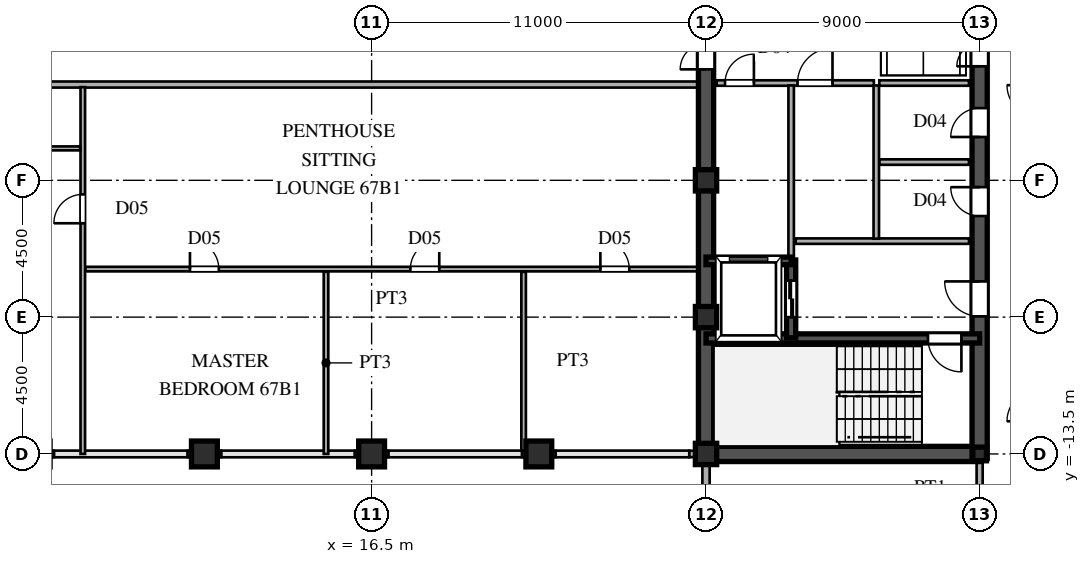
"""IFC4 building model, lengths in metres.
Left out: names, types, materials, properties, quantities, classifications, styles, units other than length and angle.
Written with IfcOpenShell. Run it as: python <this file> out.ifc"""

import sys

from ifc_helpers import new_model, si_unit, direction, frame, frame_2d, origin, origin_2d, place, context, subcontext, project, spatial, rectangle, hollow_rectangle, i_section, extrude, source, transform, mapped, element, fill, save


model = new_model("IFC4")
c1 = context("Model", 3, precision=1e-05, world=origin(), true_north=direction((0.0, 1.0)))
c2 = subcontext(c1, "Body", "Model", "MODEL_VIEW")
j1 = project(units=[si_unit("LENGTHUNIT", "METRE"), si_unit("PLANEANGLEUNIT", "RADIAN")], contexts=[c1])
p1 = place(None, origin())
s1 = spatial("IfcSite", under=j1, at=p1, CompositionType="ELEMENT")
p2 = place(p1, origin())
s2 = spatial("IfcBuilding", under=s1, at=p2, CompositionType="ELEMENT")
p3 = place(p2, frame((0.0, 0.0, 254.4)))
s3 = spatial("IfcBuildingStorey", under=s2, at=p3, CompositionType="ELEMENT", Elevation=254.4)
m1 = source(origin(), c2, "Body", "SweptSolid", [
    extrude(hollow_rectangle(XDim=0.7, YDim=0.7, WallThickness=0.03, at=origin_2d()), origin(), (0.0, 0.0, 1.0), 3.75),
])
for number, where, z_axis, x_axis in (
    (1, (27.5, -13.5, 0.0), (0.0, 0.0, 1.0), (1.0, 0.0, 0.0)),
    (2, (27.5, -9.0, 0.0), (0.0, 0.0, 1.0), (1.0, 0.0, 0.0)),
    (3, (27.5, -4.5, 0.0), (0.0, 0.0, 1.0), (1.0, 0.0, 0.0)),
):
    element("IfcColumn", number, at=place(p3, frame(where, z_axis=z_axis, x_axis=x_axis)), inside=s3, PredefinedType="COLUMN", context=c2, shape_type="MappedRepresentation", body=[
        mapped(m1, transform((0.0, 0.0, 0.0), scale=1.0)),
    ])
m2 = source(origin(), c2, "Body", "SweptSolid", [
    extrude(i_section(OverallWidth=0.45, OverallDepth=0.45, WebThickness=0.016, FlangeThickness=0.025, at=origin_2d()), origin(), (0.0, 0.0, 1.0), 3.75),
])
p4 = place(p3, frame((36.5, -13.5, 0.0), z_axis=(0.0, 0.0, 1.0), x_axis=(1.0, 0.0, 0.0)))
e4 = element("IfcColumn", 4, at=p4, inside=s3, PredefinedType="COLUMN", context=c2, shape_type="MappedRepresentation", body=[
    mapped(m2, transform((0.0, 0.0, 0.0), scale=1.0)),
])
m3 = source(origin(), c2, "Body", "SweptSolid", [
    extrude(hollow_rectangle(XDim=0.85, YDim=0.85, WallThickness=0.036, at=origin_2d()), origin(), (0.0, 0.0, 1.0), 3.75),
])
for number, where, z_axis, x_axis in (
    (5, (11.0, -13.5, 0.0), (0.0, 0.0, 1.0), (1.0, 0.0, 0.0)),
    (6, (16.5, -13.5, 0.0), (0.0, 0.0, 1.0), (1.0, 0.0, 0.0)),
    (7, (22.0, -13.5, 0.0), (0.0, 0.0, 1.0), (1.0, 0.0, 0.0)),
):
    element("IfcColumn", number, at=place(p3, frame(where, z_axis=z_axis, x_axis=x_axis)), inside=s3, PredefinedType="COLUMN", context=c2, shape_type="MappedRepresentation", body=[
        mapped(m3, transform((0.0, 0.0, 0.0), scale=1.0)),
    ])
p5 = place(p3, frame((27.5, -15.98, 0.0), z_axis=(0.0, 0.0, 1.0), x_axis=(0.0, 1.0, 0.0)))
e8 = element("IfcWall", 8, at=p5, inside=s3, PredefinedType="SOLIDWALL", context=c2, shape_type="SweptSolid", body=[
    extrude(rectangle(XDim=1.605, YDim=0.24, at=frame_2d((0.803, 0.0))), origin(), (0.0, 0.0, 1.0), 3.53),
])
p6 = place(p3, frame((27.5, -14.375, 0.0), z_axis=(0.0, 0.0, 1.0), x_axis=(0.0, 1.0, 0.0)))
e9 = element("IfcWall", 9, at=p6, inside=s3, PredefinedType="SOLIDWALL", context=c2, shape_type="SweptSolid", body=[
    extrude(rectangle(XDim=0.62, YDim=0.24, at=frame_2d((0.31, 0.0))), origin(), (0.0, 0.0, 1.0), 3.03),
])
for number, where, z_axis, x_axis in (
    (10, (4.95, -13.5, 0.0), (0.0, 0.0, 1.0), (1.0, 0.0, 0.0)),
    (11, (10.45, -13.5, 0.0), (0.0, 0.0, 1.0), (1.0, 0.0, 0.0)),
    (12, (15.95, -13.5, 0.0), (0.0, 0.0, 1.0), (1.0, 0.0, 0.0)),
    (13, (21.45, -13.5, 0.0), (0.0, 0.0, 1.0), (1.0, 0.0, 0.0)),
):
    element("IfcWall", number, at=place(p3, frame(where, z_axis=z_axis, x_axis=x_axis)), inside=s3, PredefinedType="SOLIDWALL", context=c2, shape_type="SweptSolid", body=[
        extrude(rectangle(XDim=1.1, YDim=0.21, at=frame_2d((0.55, 0.0))), origin(), (0.0, 0.0, 1.0), 3.03),
    ])
p7 = place(p3, frame((26.95, -13.5, 0.0), z_axis=(0.0, 0.0, 1.0), x_axis=(1.0, 0.0, 0.0)))
e14 = element("IfcWall", 14, at=p7, inside=s3, PredefinedType="SOLIDWALL", context=c2, shape_type="SweptSolid", body=[
    extrude(rectangle(XDim=0.54, YDim=0.21, at=frame_2d((0.27, 0.0))), origin(), (0.0, 0.0, 1.0), 3.03),
])
p8 = place(p3, frame((27.5, -13.5, 0.0), z_axis=(0.0, 0.0, 1.0), x_axis=(0.0, 1.0, 0.0)))
e15 = element("IfcWall", 15, at=p8, inside=s3, PredefinedType="SHEAR", context=c2, shape_type="SweptSolid", body=[
    extrude(rectangle(XDim=12.2, YDim=0.5, at=frame_2d((6.1, 0.0))), origin(), (0.0, 0.0, 1.0), 3.53),
])
p9 = place(p3, frame((27.5, -1.3, 0.0), z_axis=(0.0, 0.0, 1.0), x_axis=(0.0, 1.0, 0.0)))
e16 = element("IfcWall", 16, at=p9, inside=s3, PredefinedType="SHEAR", context=c2, shape_type="SweptSolid", body=[
    extrude(rectangle(XDim=2.6, YDim=0.5, at=frame_2d((1.3, 0.0))), origin(), (0.0, 0.0, 1.0), 3.53),
])
p10 = place(p9, frame((0.45, 0.0, 0.0)))
e17 = element("IfcOpeningElement", 17, at=p10, cuts=e16, PredefinedType="OPENING", context=c2, shape_type="SweptSolid", body=[
    extrude(rectangle(XDim=1.7, YDim=2.35, at=frame_2d((0.85, 1.175))), frame((0.0, 0.26, 0.0), z_axis=(0.0, -1.0, 0.0), x_axis=(1.0, 0.0, 0.0)), (0.0, 0.0, 1.0), 0.52),
])
p11 = place(p3, frame((27.5, -13.5, 0.0), z_axis=(0.0, 0.0, 1.0), x_axis=(1.0, 0.0, 0.0)))
e18 = element("IfcWall", 18, at=p11, inside=s3, PredefinedType="SHEAR", context=c2, shape_type="SweptSolid", body=[
    extrude(rectangle(XDim=9.0, YDim=0.5, at=frame_2d((4.5, 0.0))), origin(), (0.0, 0.0, 1.0), 3.53),
])
p12 = place(p3, frame((36.5, -13.65, 0.0), z_axis=(0.0, 0.0, 1.0), x_axis=(0.0, 1.0, 0.0)))
e19 = element("IfcWall", 19, at=p12, inside=s3, PredefinedType="SHEAR", context=c2, shape_type="SweptSolid", body=[
    extrude(rectangle(XDim=7.15, YDim=0.5, at=frame_2d((3.575, 0.0))), origin(), (0.0, 0.0, 1.0), 3.53),
])
p13 = place(p12, frame((4.675, 0.0, 0.0)))
e20 = element("IfcOpeningElement", 20, at=p13, cuts=e19, PredefinedType="OPENING", context=c2, shape_type="SweptSolid", body=[
    extrude(rectangle(XDim=1.15, YDim=2.2, at=frame_2d((0.575, 1.1))), frame((0.0, 0.26, 0.0), z_axis=(0.0, -1.0, 0.0), x_axis=(1.0, 0.0, 0.0)), (0.0, 0.0, 1.0), 0.52),
])
p14 = place(p3, frame((36.5, -1.3, 0.0), z_axis=(0.0, 0.0, 1.0), x_axis=(0.0, 1.0, 0.0)))
e21 = element("IfcWall", 21, at=p14, inside=s3, PredefinedType="SHEAR", context=c2, shape_type="SweptSolid", body=[
    extrude(rectangle(XDim=2.6, YDim=0.5, at=frame_2d((1.3, 0.0))), origin(), (0.0, 0.0, 1.0), 3.53),
])
p15 = place(p14, frame((0.55, 0.0, 0.0)))
e22 = element("IfcOpeningElement", 22, at=p15, cuts=e21, PredefinedType="OPENING", context=c2, shape_type="SweptSolid", body=[
    extrude(rectangle(XDim=1.5, YDim=2.3, at=frame_2d((0.75, 1.15))), frame((0.0, 0.26, 0.0), z_axis=(0.0, -1.0, 0.0), x_axis=(1.0, 0.0, 0.0)), (0.0, 0.0, 1.0), 0.52),
])
p16 = place(p3, frame((36.5, -6.5, 0.0), z_axis=(0.0, 0.0, 1.0), x_axis=(0.0, 1.0, 0.0)))
e23 = element("IfcWall", 23, at=p16, inside=s3, PredefinedType="SHEAR", context=c2, shape_type="SweptSolid", body=[
    extrude(rectangle(XDim=2.6, YDim=0.5, at=frame_2d((1.3, 0.0))), origin(), (0.0, 0.0, 1.0), 3.53),
])
p17 = place(p16, frame((0.825, 0.0, 0.0)))
e24 = element("IfcOpeningElement", 24, at=p17, cuts=e23, PredefinedType="OPENING", context=c2, shape_type="SweptSolid", body=[
    extrude(rectangle(XDim=0.95, YDim=2.15, at=frame_2d((0.475, 1.075))), frame((0.0, 0.26, 0.0), z_axis=(0.0, -1.0, 0.0), x_axis=(1.0, 0.0, 0.0)), (0.0, 0.0, 1.0), 0.52),
])
p18 = place(p3, frame((36.5, -3.9, 0.0), z_axis=(0.0, 0.0, 1.0), x_axis=(0.0, 1.0, 0.0)))
e25 = element("IfcWall", 25, at=p18, inside=s3, PredefinedType="SHEAR", context=c2, shape_type="SweptSolid", body=[
    extrude(rectangle(XDim=2.6, YDim=0.5, at=frame_2d((1.3, 0.0))), origin(), (0.0, 0.0, 1.0), 3.53),
])
p19 = place(p18, frame((0.825, 0.0, 0.0)))
e26 = element("IfcOpeningElement", 26, at=p19, cuts=e25, PredefinedType="OPENING", context=c2, shape_type="SweptSolid", body=[
    extrude(rectangle(XDim=0.95, YDim=2.15, at=frame_2d((0.475, 1.075))), frame((0.0, 0.26, 0.0), z_axis=(0.0, -1.0, 0.0), x_axis=(1.0, 0.0, 0.0)), (0.0, 0.0, 1.0), 0.52),
])
p20 = place(p3, frame((27.5, -9.7, 0.0), z_axis=(0.0, 0.0, 1.0), x_axis=(1.0, 0.0, 0.0)))
e27 = element("IfcWall", 27, at=p20, inside=s3, PredefinedType="SHEAR", context=c2, shape_type="SweptSolid", body=[
    extrude(rectangle(XDim=9.0, YDim=0.3, at=frame_2d((4.5, 0.0))), origin(), (0.0, 0.0, 1.0), 3.53),
])
p21 = place(p20, frame((7.3, 0.0, 0.0)))
e28 = element("IfcOpeningElement", 28, at=p21, cuts=e27, PredefinedType="OPENING", context=c2, shape_type="SweptSolid", body=[
    extrude(rectangle(XDim=1.1, YDim=2.2, at=frame_2d((0.55, 1.1))), frame((0.0, 0.16, 0.0), z_axis=(0.0, -1.0, 0.0), x_axis=(1.0, 0.0, 0.0)), (0.0, 0.0, 1.0), 0.32),
])
p22 = place(p3, frame((27.5, -7.15, 0.0), z_axis=(0.0, 0.0, 1.0), x_axis=(1.0, 0.0, 0.0)))
e29 = element("IfcWall", 29, at=p22, inside=s3, PredefinedType="SHEAR", context=c2, shape_type="SweptSolid", body=[
    extrude(rectangle(XDim=2.8, YDim=0.25, at=frame_2d((1.4, 0.0))), origin(), (0.0, 0.0, 1.0), 3.53),
])
p23 = place(p3, frame((30.3, -9.68, 0.0), z_axis=(0.0, 0.0, 1.0), x_axis=(0.0, 1.0, 0.0)))
e30 = element("IfcWall", 30, at=p23, inside=s3, PredefinedType="SHEAR", context=c2, shape_type="SweptSolid", body=[
    extrude(rectangle(XDim=2.56, YDim=0.3, at=frame_2d((1.28, 0.0))), origin(), (0.0, 0.0, 1.0), 3.53),
])
p24 = place(p23, frame((0.68, 0.0, 0.0)))
e31 = element("IfcOpeningElement", 31, at=p24, cuts=e30, PredefinedType="OPENING", context=c2, shape_type="SweptSolid", body=[
    extrude(rectangle(XDim=1.2, YDim=2.25, at=frame_2d((0.6, 1.125))), frame((0.0, 0.16, 0.0), z_axis=(0.0, -1.0, 0.0), x_axis=(1.0, 0.0, 0.0)), (0.0, 0.0, 1.0), 0.32),
])
p25 = place(p3, frame((30.45, -6.5, 0.0), z_axis=(0.0, 0.0, 1.0), x_axis=(1.0, 0.0, 0.0)))
e32 = element("IfcWall", 32, at=p25, inside=s3, PredefinedType="PARTITIONING", context=c2, shape_type="SweptSolid", body=[
    extrude(rectangle(XDim=5.7, YDim=0.18, at=frame_2d((2.85, 0.0))), origin(), (0.0, 0.0, 1.0), 3.53),
])
p26 = place(p3, frame((33.1, -6.42, 0.0), z_axis=(0.0, 0.0, 1.0), x_axis=(0.0, 1.0, 0.0)))
e33 = element("IfcWall", 33, at=p26, inside=s3, PredefinedType="PARTITIONING", context=c2, shape_type="SweptSolid", body=[
    extrude(rectangle(XDim=5.04, YDim=0.18, at=frame_2d((2.52, 0.0))), origin(), (0.0, 0.0, 1.0), 3.53),
])
p27 = place(p3, frame((27.85, -1.3, 0.0), z_axis=(0.0, 0.0, 1.0), x_axis=(1.0, 0.0, 0.0)))
e34 = element("IfcWall", 34, at=p27, inside=s3, PredefinedType="PARTITIONING", context=c2, shape_type="SweptSolid", body=[
    extrude(rectangle(XDim=2.45, YDim=0.18, at=frame_2d((1.225, 0.0))), origin(), (0.0, 0.0, 1.0), 3.53),
])
p28 = place(p27, frame((0.275, 0.0, 0.0)))
e35 = element("IfcOpeningElement", 35, at=p28, cuts=e34, PredefinedType="OPENING", context=c2, shape_type="SweptSolid", body=[
    extrude(rectangle(XDim=0.95, YDim=2.15, at=frame_2d((0.475, 1.075))), frame((0.0, 0.1, 0.0), z_axis=(0.0, -1.0, 0.0), x_axis=(1.0, 0.0, 0.0)), (0.0, 0.0, 1.0), 0.2),
])
p29 = place(p3, frame((30.3, -1.3, 0.0), z_axis=(0.0, 0.0, 1.0), x_axis=(1.0, 0.0, 0.0)))
e36 = element("IfcWall", 36, at=p29, inside=s3, PredefinedType="PARTITIONING", context=c2, shape_type="SweptSolid", body=[
    extrude(rectangle(XDim=2.72, YDim=0.18, at=frame_2d((1.36, 0.0))), origin(), (0.0, 0.0, 1.0), 3.53),
])
p30 = place(p29, frame((0.21, 0.0, 0.0)))
e37 = element("IfcOpeningElement", 37, at=p30, cuts=e36, PredefinedType="OPENING", context=c2, shape_type="SweptSolid", body=[
    extrude(rectangle(XDim=1.15, YDim=2.2, at=frame_2d((0.575, 1.1))), frame((0.0, 0.1, 0.0), z_axis=(0.0, -1.0, 0.0), x_axis=(1.0, 0.0, 0.0)), (0.0, 0.0, 1.0), 0.2),
])
p31 = place(p3, frame((30.3, -7.12, 0.0), z_axis=(0.0, 0.0, 1.0), x_axis=(0.0, 1.0, 0.0)))
e38 = element("IfcWall", 38, at=p31, inside=s3, PredefinedType="PARTITIONING", context=c2, shape_type="SweptSolid", body=[
    extrude(rectangle(XDim=5.74, YDim=0.18, at=frame_2d((2.87, 0.0))), origin(), (0.0, 0.0, 1.0), 3.53),
])
for number, where, z_axis, x_axis in (
    (39, (33.2, -1.3, 0.0), (0.0, 0.0, 1.0), (1.0, 0.0, 0.0)),
    (40, (33.2, -3.9, 0.0), (0.0, 0.0, 1.0), (1.0, 0.0, 0.0)),
):
    element("IfcWall", number, at=place(p3, frame(where, z_axis=z_axis, x_axis=x_axis)), inside=s3, PredefinedType="PARTITIONING", context=c2, shape_type="SweptSolid", body=[
        extrude(rectangle(XDim=2.95, YDim=0.18, at=frame_2d((1.475, 0.0))), origin(), (0.0, 0.0, 1.0), 3.53),
    ])
p32 = place(p3, frame((7.085, -7.42, 0.0), z_axis=(0.0, 0.0, 1.0), x_axis=(1.0, 0.0, 0.0)))
e41 = element("IfcWall", 41, at=p32, inside=s3, PredefinedType="PARTITIONING", context=c2, shape_type="SweptSolid", body=[
    extrude(rectangle(XDim=20.16, YDim=0.15, at=frame_2d((10.08, 0.0))), origin(), (0.0, 0.0, 1.0), 3.53),
])
p33 = place(p32, frame((3.44, 0.0, 0.0)))
e42 = element("IfcOpeningElement", 42, at=p33, cuts=e41, PredefinedType="OPENING", context=c2, shape_type="SweptSolid", body=[
    extrude(rectangle(XDim=0.95, YDim=2.15, at=frame_2d((0.475, 1.075))), frame((0.0, 0.085, 0.0), z_axis=(0.0, -1.0, 0.0), x_axis=(1.0, 0.0, 0.0)), (0.0, 0.0, 1.0), 0.17),
])
p34 = place(p32, frame((10.69, 0.0, 0.0)))
e43 = element("IfcOpeningElement", 43, at=p34, cuts=e41, PredefinedType="OPENING", context=c2, shape_type="SweptSolid", body=[
    extrude(rectangle(XDim=0.95, YDim=2.15, at=frame_2d((0.475, 1.075))), frame((0.0, 0.085, 0.0), z_axis=(0.0, -1.0, 0.0), x_axis=(1.0, 0.0, 0.0)), (0.0, 0.0, 1.0), 0.17),
])
p35 = place(p32, frame((16.94, 0.0, 0.0)))
e44 = element("IfcOpeningElement", 44, at=p35, cuts=e41, PredefinedType="OPENING", context=c2, shape_type="SweptSolid", body=[
    extrude(rectangle(XDim=0.95, YDim=2.15, at=frame_2d((0.475, 1.075))), frame((0.0, 0.085, 0.0), z_axis=(0.0, -1.0, 0.0), x_axis=(1.0, 0.0, 0.0)), (0.0, 0.0, 1.0), 0.17),
])
p36 = place(p3, frame((1.585, -3.45, 0.0), z_axis=(0.0, 0.0, 1.0), x_axis=(1.0, 0.0, 0.0)))
e45 = element("IfcWall", 45, at=p36, inside=s3, PredefinedType="PARTITIONING", context=c2, shape_type="SweptSolid", body=[
    extrude(rectangle(XDim=5.33, YDim=0.13, at=frame_2d((2.665, 0.0))), origin(), (0.0, 0.0, 1.0), 3.53),
])
p37 = place(p3, frame((-27.245, -1.35, 0.0), z_axis=(0.0, 0.0, 1.0), x_axis=(1.0, 0.0, 0.0)))
e46 = element("IfcWall", 46, at=p37, inside=s3, PredefinedType="PARTITIONING", context=c2, shape_type="SweptSolid", body=[
    extrude(rectangle(XDim=54.49, YDim=0.2, at=frame_2d((27.245, 0.0))), origin(), (0.0, 0.0, 1.0), 3.53),
])
p38 = place(p37, frame((24.97, 0.0, 0.0)))
e47 = element("IfcOpeningElement", 47, at=p38, cuts=e46, PredefinedType="OPENING", context=c2, shape_type="SweptSolid", body=[
    extrude(rectangle(XDim=1.05, YDim=2.25, at=frame_2d((0.525, 1.125))), frame((0.0, 0.11, 0.0), z_axis=(0.0, -1.0, 0.0), x_axis=(1.0, 0.0, 0.0)), (0.0, 0.0, 1.0), 0.22),
])
p39 = place(p3, frame((7.0, -13.5, 0.0), z_axis=(0.0, 0.0, 1.0), x_axis=(0.0, 1.0, 0.0)))
e48 = element("IfcWall", 48, at=p39, inside=s3, PredefinedType="PARTITIONING", context=c2, shape_type="SweptSolid", body=[
    extrude(rectangle(XDim=12.065, YDim=0.15, at=frame_2d((6.032, 0.0))), origin(), (0.0, 0.0, 1.0), 3.53),
])
p40 = place(p39, frame((7.587, 0.0, 0.0)))
e49 = element("IfcOpeningElement", 49, at=p40, cuts=e48, PredefinedType="OPENING", context=c2, shape_type="SweptSolid", body=[
    extrude(rectangle(XDim=0.95, YDim=2.15, at=frame_2d((0.475, 1.075))), frame((0.0, 0.085, 0.0), z_axis=(0.0, -1.0, 0.0), x_axis=(1.0, 0.0, 0.0)), (0.0, 0.0, 1.0), 0.17),
])
p41 = place(p3, frame((15.0, -13.5, 0.0), z_axis=(0.0, 0.0, 1.0), x_axis=(0.0, 1.0, 0.0)))
e50 = element("IfcWall", 50, at=p41, inside=s3, PredefinedType="PARTITIONING", context=c2, shape_type="SweptSolid", body=[
    extrude(rectangle(XDim=5.99, YDim=0.15, at=frame_2d((2.995, 0.0))), origin(), (0.0, 0.0, 1.0), 3.53),
])
p42 = place(p3, frame((21.5, -13.39, 0.0), z_axis=(0.0, 0.0, 1.0), x_axis=(0.0, 1.0, 0.0)))
e51 = element("IfcWall", 51, at=p42, inside=s3, PredefinedType="PARTITIONING", context=c2, shape_type="SweptSolid", body=[
    extrude(rectangle(XDim=5.88, YDim=0.15, at=frame_2d((2.94, 0.0))), origin(), (0.0, 0.0, 1.0), 3.53),
])
p43 = place(p3, frame((36.5, -15.515, 0.0), z_axis=(0.0, 0.0, 1.0), x_axis=(0.0, 1.0, 0.0)))
e52 = element("IfcWall", 52, at=p43, inside=s3, PredefinedType="PARTITIONING", context=c2, shape_type="SweptSolid", body=[
    extrude(rectangle(XDim=1.76, YDim=0.2, at=frame_2d((0.88, 0.0))), origin(), (0.0, 0.0, 1.0), 2.93),
])
m4 = source(origin(), c2, "Body", "SweptSolid", [
    extrude(rectangle(XDim=1.7, YDim=2.35, at=frame_2d((0.85, 1.175))), frame((0.0, 0.025, 0.0), z_axis=(0.0, -1.0, 0.0), x_axis=(1.0, 0.0, 0.0)), (0.0, 0.0, 1.0), 0.05),
])
p44 = place(p10, origin())
e53 = element("IfcDoor", 53, at=p44, inside=s3, OperationType="DOUBLE_SWING_LEFT", PredefinedType="DOOR", context=c2, shape_type="MappedRepresentation", body=[
    mapped(m4, transform((0.0, 0.0, 0.0), scale=1.0)),
])
fill(e17, e53)
m5 = source(origin(), c2, "Body", "SweptSolid", [
    extrude(rectangle(XDim=1.15, YDim=2.2, at=frame_2d((0.575, 1.1))), frame((0.0, 0.025, 0.0), z_axis=(0.0, -1.0, 0.0), x_axis=(1.0, 0.0, 0.0)), (0.0, 0.0, 1.0), 0.05),
])
p45 = place(p13, origin())
e54 = element("IfcDoor", 54, at=p45, inside=s3, OperationType="SINGLE_SWING_RIGHT", PredefinedType="DOOR", context=c2, shape_type="MappedRepresentation", body=[
    mapped(m5, transform((0.0, 0.0, 0.0), scale=1.0)),
])
fill(e20, e54)
m6 = source(origin(), c2, "Body", "SweptSolid", [
    extrude(rectangle(XDim=1.5, YDim=2.3, at=frame_2d((0.75, 1.15))), frame((0.0, 0.025, 0.0), z_axis=(0.0, -1.0, 0.0), x_axis=(1.0, 0.0, 0.0)), (0.0, 0.0, 1.0), 0.05),
])
p46 = place(p15, origin())
e55 = element("IfcDoor", 55, at=p46, inside=s3, OperationType="DOUBLE_SWING_LEFT", PredefinedType="DOOR", context=c2, shape_type="MappedRepresentation", body=[
    mapped(m6, transform((0.0, 0.0, 0.0), scale=1.0)),
])
fill(e22, e55)
m7 = source(origin(), c2, "Body", "SweptSolid", [
    extrude(rectangle(XDim=0.95, YDim=2.15, at=frame_2d((0.475, 1.075))), frame((0.0, 0.025, 0.0), z_axis=(0.0, -1.0, 0.0), x_axis=(1.0, 0.0, 0.0)), (0.0, 0.0, 1.0), 0.05),
])
p47 = place(p17, origin())
e56 = element("IfcDoor", 56, at=p47, inside=s3, OperationType="SINGLE_SWING_RIGHT", PredefinedType="DOOR", context=c2, shape_type="MappedRepresentation", body=[
    mapped(m7, transform((0.0, 0.0, 0.0), scale=1.0)),
])
fill(e24, e56)
p48 = place(p19, origin())
e57 = element("IfcDoor", 57, at=p48, inside=s3, OperationType="SINGLE_SWING_LEFT", PredefinedType="DOOR", context=c2, shape_type="MappedRepresentation", body=[
    mapped(m7, transform((0.0, 0.0, 0.0), scale=1.0)),
])
fill(e26, e57)
m8 = source(origin(), c2, "Body", "SweptSolid", [
    extrude(rectangle(XDim=1.1, YDim=2.2, at=frame_2d((0.55, 1.1))), frame((0.0, 0.025, 0.0), z_axis=(0.0, -1.0, 0.0), x_axis=(1.0, 0.0, 0.0)), (0.0, 0.0, 1.0), 0.05),
])
p49 = place(p21, frame((1.1, 0.0, 0.0), z_axis=(0.0, 0.0, 1.0), x_axis=(-1.0, 0.0, 0.0)))
e58 = element("IfcDoor", 58, at=p49, inside=s3, OperationType="SINGLE_SWING_RIGHT", PredefinedType="DOOR", context=c2, shape_type="MappedRepresentation", body=[
    mapped(m8, transform((0.0, 0.0, 0.0), scale=1.0)),
])
fill(e28, e58)
m9 = source(origin(), c2, "Body", "SweptSolid", [
    extrude(rectangle(XDim=1.2, YDim=2.25, at=frame_2d((0.6, 1.125))), frame((0.0, 0.025, 0.0), z_axis=(0.0, -1.0, 0.0), x_axis=(1.0, 0.0, 0.0)), (0.0, 0.0, 1.0), 0.05),
])
p50 = place(p24, origin())
e59 = element("IfcDoor", 59, at=p50, inside=s3, OperationType="DOUBLE_DOOR_SLIDING", PredefinedType="DOOR", context=c2, shape_type="MappedRepresentation", body=[
    mapped(m9, transform((0.0, 0.0, 0.0), scale=1.0)),
])
fill(e31, e59)
p51 = place(p28, origin())
e60 = element("IfcDoor", 60, at=p51, inside=s3, OperationType="SINGLE_SWING_RIGHT", PredefinedType="DOOR", context=c2, shape_type="MappedRepresentation", body=[
    mapped(m7, transform((0.0, 0.0, 0.0), scale=1.0)),
])
fill(e35, e60)
p52 = place(p30, origin())
e61 = element("IfcDoor", 61, at=p52, inside=s3, OperationType="SINGLE_SWING_RIGHT", PredefinedType="DOOR", context=c2, shape_type="MappedRepresentation", body=[
    mapped(m5, transform((0.0, 0.0, 0.0), scale=1.0)),
])
fill(e37, e61)
m10 = source(origin(), c2, "Body", "SweptSolid", [
    extrude(rectangle(XDim=0.95, YDim=2.15, at=frame_2d((0.475, 1.075))), frame((0.0, 0.025, 0.0), z_axis=(0.0, -1.0, 0.0), x_axis=(1.0, 0.0, 0.0)), (0.0, 0.0, 1.0), 0.05),
])
p53 = place(p33, origin())
e62 = element("IfcDoor", 62, at=p53, inside=s3, OperationType="SINGLE_SWING_LEFT", PredefinedType="DOOR", context=c2, shape_type="MappedRepresentation", body=[
    mapped(m10, transform((0.0, 0.0, 0.0), scale=1.0)),
])
fill(e42, e62)
p54 = place(p34, origin())
e63 = element("IfcDoor", 63, at=p54, inside=s3, OperationType="SINGLE_SWING_RIGHT", PredefinedType="DOOR", context=c2, shape_type="MappedRepresentation", body=[
    mapped(m10, transform((0.0, 0.0, 0.0), scale=1.0)),
])
fill(e43, e63)
p55 = place(p35, origin())
e64 = element("IfcDoor", 64, at=p55, inside=s3, OperationType="SINGLE_SWING_LEFT", PredefinedType="DOOR", context=c2, shape_type="MappedRepresentation", body=[
    mapped(m10, transform((0.0, 0.0, 0.0), scale=1.0)),
])
fill(e44, e64)
p56 = place(p40, origin())
e65 = element("IfcDoor", 65, at=p56, inside=s3, OperationType="SINGLE_SWING_LEFT", PredefinedType="DOOR", context=c2, shape_type="MappedRepresentation", body=[
    mapped(m10, transform((0.0, 0.0, 0.0), scale=1.0)),
])
fill(e49, e65)
save(model, sys.argv[1])
